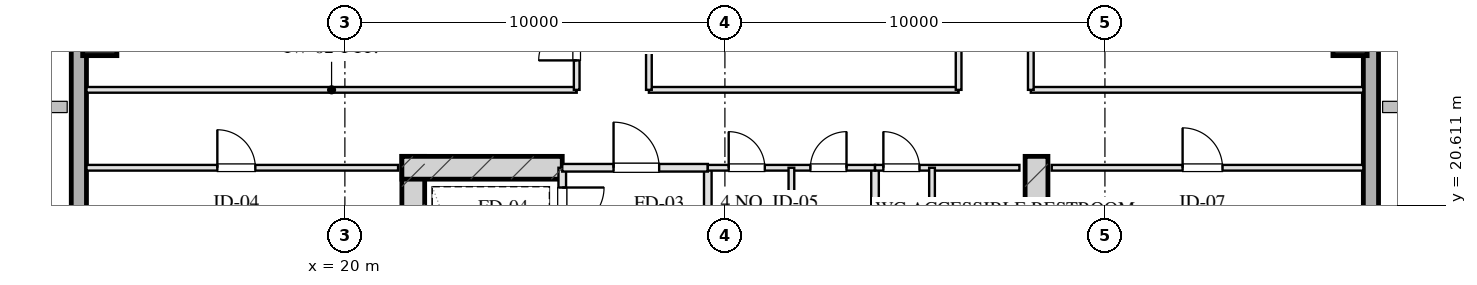
"""IFC4 building model, lengths in metres.
Left out: names, types, materials, properties, quantities, classifications, styles, units other than length and angle.
Written with IfcOpenShell. Run it as: python <this file> out.ifc"""

import sys

from ifc_helpers import new_model, si_unit, direction, frame, frame_2d, origin, origin_2d, place, context, subcontext, project, spatial, rectangle, hollow_rectangle, extrude, element, fill, save


model = new_model("IFC4")
c1 = context("Model", 3, precision=1e-05, world=origin(), true_north=direction((0.0, 1.0)))
c2 = subcontext(c1, "Body", "Model", "MODEL_VIEW")
j1 = project(units=[si_unit("LENGTHUNIT", "METRE"), si_unit("PLANEANGLEUNIT", "RADIAN")], contexts=[c1])
p1 = place(None, origin())
s1 = spatial("IfcSite", under=j1, at=p1, CompositionType="ELEMENT")
p2 = place(p1, origin())
s2 = spatial("IfcBuilding", under=s1, at=p2, CompositionType="ELEMENT")
p3 = place(p2, frame((0.0, 0.0, 173.65)))
s3 = spatial("IfcBuildingStorey", under=s2, at=p3, CompositionType="ELEMENT", Elevation=173.65)
for number, where, z_axis, x_axis in (
    (1, (21.8, 21.9, 0.0), (0.0, 0.0, 1.0), (0.0, -1.0, 0.0)),
    (2, (38.2, 21.9, 0.0), (0.0, 0.0, 1.0), (0.0, -1.0, 0.0)),
):
    element("IfcWall", number, at=place(p3, frame(where, z_axis=z_axis, x_axis=x_axis)), inside=s3, PredefinedType="SHEAR", context=c2, shape_type="SweptSolid", body=[
        extrude(rectangle(XDim=9.48, YDim=0.6, at=frame_2d((4.74, 0.0))), origin(), (0.0, 0.0, 1.0), 3.45),
    ])
p4 = place(p3, frame((21.5, 21.6, 0.0), z_axis=(0.0, 0.0, 1.0), x_axis=(1.0, 0.0, 0.0)))
e3 = element("IfcWall", 3, at=p4, inside=s3, PredefinedType="SHEAR", context=c2, shape_type="SweptSolid", body=[
    extrude(rectangle(XDim=4.22, YDim=0.6, at=frame_2d((2.11, 0.0))), origin(), (0.0, 0.0, 1.0), 3.45),
])
for number, where, z_axis, x_axis in (
    (4, (13.55, 25.0, 0.0), (0.0, 0.0, 1.0), (1.0, 0.0, 0.0)),
    (5, (46.45, 25.0, 0.0), (0.0, 0.0, 1.0), (1.0, 0.0, 0.0)),
):
    element("IfcColumn", number, at=place(p3, frame(where, z_axis=z_axis, x_axis=x_axis)), inside=s3, PredefinedType="COLUMN", context=c2, shape_type="SweptSolid", body=[
        extrude(hollow_rectangle(XDim=0.9, YDim=0.9, WallThickness=0.032, at=origin_2d()), origin(), (0.0, 0.0, 1.0), 3.451),
    ])
p5 = place(p3, frame((13.0, 10.8, 0.0), z_axis=(0.0, 0.0, 1.0), x_axis=(0.0, 1.0, 0.0)))
e6 = element("IfcWall", 6, at=p5, inside=s3, PredefinedType="SOLIDWALL", context=c2, shape_type="SweptSolid", body=[
    extrude(rectangle(XDim=46.4, YDim=0.4, at=frame_2d((23.2, 0.0))), origin(), (0.0, 0.0, 1.0), 2.61),
])
p6 = place(p5, frame((16.85, 0.0, 0.0)))
e7 = element("IfcOpeningElement", 7, at=p6, cuts=e6, PredefinedType="OPENING", context=c2, shape_type="SweptSolid", body=[
    extrude(rectangle(XDim=1.1, YDim=2.15, at=frame_2d((0.55, 1.075))), frame((0.0, 0.21, 0.0), z_axis=(0.0, -1.0, 0.0), x_axis=(1.0, 0.0, 0.0)), (0.0, 0.0, 1.0), 0.42),
])
p7 = place(p3, frame((47.0, 57.2, 0.0), z_axis=(0.0, 0.0, 1.0), x_axis=(0.0, -1.0, 0.0)))
e8 = element("IfcWall", 8, at=p7, inside=s3, PredefinedType="SOLIDWALL", context=c2, shape_type="SweptSolid", body=[
    extrude(rectangle(XDim=46.4, YDim=0.4, at=frame_2d((23.2, 0.0))), origin(), (0.0, 0.0, 1.0), 2.61),
])
p8 = place(p7, frame((19.475, 0.0, 0.75)))
e9 = element("IfcOpeningElement", 9, at=p8, cuts=e8, PredefinedType="OPENING", context=c2, shape_type="SweptSolid", body=[
    extrude(rectangle(XDim=2.25, YDim=1.46, at=frame_2d((1.125, 0.73))), frame((0.0, 0.21, 0.0), z_axis=(0.0, -1.0, 0.0), x_axis=(1.0, 0.0, 0.0)), (0.0, 0.0, 1.0), 0.42),
])
p9 = place(p7, frame((15.675, 0.0, 0.75)))
e10 = element("IfcOpeningElement", 10, at=p9, cuts=e8, PredefinedType="OPENING", context=c2, shape_type="SweptSolid", body=[
    extrude(rectangle(XDim=2.25, YDim=1.46, at=frame_2d((1.125, 0.73))), frame((0.0, 0.21, 0.0), z_axis=(0.0, -1.0, 0.0), x_axis=(1.0, 0.0, 0.0)), (0.0, 0.0, 1.0), 0.42),
])
p10 = place(p7, frame((27.05, 0.0, 0.0)))
e11 = element("IfcOpeningElement", 11, at=p10, cuts=e8, PredefinedType="OPENING", context=c2, shape_type="SweptSolid", body=[
    extrude(rectangle(XDim=1.1, YDim=2.15, at=frame_2d((0.55, 1.075))), frame((0.0, 0.21, 0.0), z_axis=(0.0, -1.0, 0.0), x_axis=(1.0, 0.0, 0.0)), (0.0, 0.0, 1.0), 0.42),
])
p11 = place(p3, frame((25.72, 21.6, 0.0), z_axis=(0.0, 0.0, 1.0), x_axis=(0.0, -1.0, 0.0)))
e12 = element("IfcWall", 12, at=p11, inside=s3, PredefinedType="PARTITIONING", context=c2, shape_type="SweptSolid", body=[
    extrude(rectangle(XDim=1.9, YDim=0.2, at=frame_2d((0.95, 0.0))), origin(), (0.0, 0.0, 1.0), 3.175),
])
p12 = place(p11, frame((0.52, 0.0, 0.0)))
e13 = element("IfcOpeningElement", 13, at=p12, cuts=e12, PredefinedType="OPENING", context=c2, shape_type="SweptSolid", body=[
    extrude(rectangle(XDim=1.1, YDim=2.05, at=frame_2d((0.55, 1.025))), frame((0.0, 0.11, 0.0), z_axis=(0.0, -1.0, 0.0), x_axis=(1.0, 0.0, 0.0)), (0.0, 0.0, 1.0), 0.22),
])
p13 = place(p3, frame((29.55, 21.6, 0.0), z_axis=(0.0, 0.0, 1.0), x_axis=(0.0, -1.0, 0.0)))
e14 = element("IfcWall", 14, at=p13, inside=s3, PredefinedType="PARTITIONING", context=c2, shape_type="SweptSolid", body=[
    extrude(rectangle(XDim=8.43, YDim=0.2, at=frame_2d((4.215, 0.0))), origin(), (0.0, 0.0, 1.0), 3.175),
])
p14 = place(p3, frame((25.72, 21.6, 0.0), z_axis=(0.0, 0.0, 1.0), x_axis=(1.0, 0.0, 0.0)))
e15 = element("IfcWall", 15, at=p14, inside=s3, PredefinedType="PARTITIONING", context=c2, shape_type="SweptSolid", body=[
    extrude(rectangle(XDim=3.83, YDim=0.2, at=frame_2d((1.915, 0.0))), origin(), (0.0, 0.0, 1.0), 3.175),
])
p15 = place(p14, frame((1.35, 0.0, 0.0)))
e16 = element("IfcOpeningElement", 16, at=p15, cuts=e15, PredefinedType="OPENING", context=c2, shape_type="SweptSolid", body=[
    extrude(rectangle(XDim=1.2, YDim=2.05, at=frame_2d((0.6, 1.025))), frame((0.0, 0.11, 0.0), z_axis=(0.0, -1.0, 0.0), x_axis=(1.0, 0.0, 0.0)), (0.0, 0.0, 1.0), 0.22),
])
p16 = place(p3, frame((33.95, 21.6, 0.0), z_axis=(0.0, 0.0, 1.0), x_axis=(0.0, -1.0, 0.0)))
e17 = element("IfcWall", 17, at=p16, inside=s3, PredefinedType="PARTITIONING", context=c2, shape_type="SweptSolid", body=[
    extrude(rectangle(XDim=8.43, YDim=0.2, at=frame_2d((4.215, 0.0))), origin(), (0.0, 0.0, 1.0), 3.175),
])
p17 = place(p3, frame((29.55, 21.6, 0.0), z_axis=(0.0, 0.0, 1.0), x_axis=(1.0, 0.0, 0.0)))
e18 = element("IfcWall", 18, at=p17, inside=s3, PredefinedType="PARTITIONING", context=c2, shape_type="SweptSolid", body=[
    extrude(rectangle(XDim=4.4, YDim=0.15, at=frame_2d((2.2, 0.0))), origin(), (0.0, 0.0, 1.0), 3.175),
])
p18 = place(p17, frame((0.55, 0.0, 0.0)))
e19 = element("IfcOpeningElement", 19, at=p18, cuts=e18, PredefinedType="OPENING", context=c2, shape_type="SweptSolid", body=[
    extrude(rectangle(XDim=0.95, YDim=2.05, at=frame_2d((0.475, 1.025))), frame((0.0, 0.085, 0.0), z_axis=(0.0, -1.0, 0.0), x_axis=(1.0, 0.0, 0.0)), (0.0, 0.0, 1.0), 0.17),
])
p19 = place(p17, frame((2.7, 0.0, 0.0)))
e20 = element("IfcOpeningElement", 20, at=p19, cuts=e18, PredefinedType="OPENING", context=c2, shape_type="SweptSolid", body=[
    extrude(rectangle(XDim=0.95, YDim=2.05, at=frame_2d((0.475, 1.025))), frame((0.0, 0.085, 0.0), z_axis=(0.0, -1.0, 0.0), x_axis=(1.0, 0.0, 0.0)), (0.0, 0.0, 1.0), 0.17),
])
p20 = place(p3, frame((31.75, 21.6, 0.0), z_axis=(0.0, 0.0, 1.0), x_axis=(0.0, -1.0, 0.0)))
e21 = element("IfcWall", 21, at=p20, inside=s3, PredefinedType="PARTITIONING", context=c2, shape_type="SweptSolid", body=[
    extrude(rectangle(XDim=8.43, YDim=0.15, at=frame_2d((4.215, 0.0))), origin(), (0.0, 0.0, 1.0), 3.175),
])
p21 = place(p3, frame((33.95, 21.6, 0.0), z_axis=(0.0, 0.0, 1.0), x_axis=(1.0, 0.0, 0.0)))
e22 = element("IfcWall", 22, at=p21, inside=s3, PredefinedType="PARTITIONING", context=c2, shape_type="SweptSolid", body=[
    extrude(rectangle(XDim=3.8, YDim=0.15, at=frame_2d((1.9, 0.0))), origin(), (0.0, 0.0, 1.0), 3.175),
])
p22 = place(p21, frame((0.22, 0.0, 0.0)))
e23 = element("IfcOpeningElement", 23, at=p22, cuts=e22, PredefinedType="OPENING", context=c2, shape_type="SweptSolid", body=[
    extrude(rectangle(XDim=0.95, YDim=2.05, at=frame_2d((0.475, 1.025))), frame((0.0, 0.085, 0.0), z_axis=(0.0, -1.0, 0.0), x_axis=(1.0, 0.0, 0.0)), (0.0, 0.0, 1.0), 0.17),
])
p23 = place(p3, frame((35.45, 21.6, 0.0), z_axis=(0.0, 0.0, 1.0), x_axis=(0.0, -1.0, 0.0)))
e24 = element("IfcWall", 24, at=p23, inside=s3, PredefinedType="PARTITIONING", context=c2, shape_type="SweptSolid", body=[
    extrude(rectangle(XDim=8.43, YDim=0.15, at=frame_2d((4.215, 0.0))), origin(), (0.0, 0.0, 1.0), 2.765),
])
p24 = place(p23, frame((2.55, 0.0, 0.0)))
e25 = element("IfcOpeningElement", 25, at=p24, cuts=e24, PredefinedType="OPENING", context=c2, shape_type="SweptSolid", body=[
    extrude(rectangle(XDim=0.95, YDim=2.05, at=frame_2d((0.475, 1.025))), frame((0.0, 0.085, 0.0), z_axis=(0.0, -1.0, 0.0), x_axis=(1.0, 0.0, 0.0)), (0.0, 0.0, 1.0), 0.17),
])
p25 = place(p23, frame((5.8, 0.0, 0.0)))
e26 = element("IfcOpeningElement", 26, at=p25, cuts=e24, PredefinedType="OPENING", context=c2, shape_type="SweptSolid", body=[
    extrude(rectangle(XDim=0.9, YDim=2.05, at=frame_2d((0.45, 1.025))), frame((0.0, 0.085, 0.0), z_axis=(0.0, -1.0, 0.0), x_axis=(1.0, 0.0, 0.0)), (0.0, 0.0, 1.0), 0.17),
])
p26 = place(p3, frame((13.2, 21.6, 0.0), z_axis=(0.0, 0.0, 1.0), x_axis=(1.0, 0.0, 0.0)))
e27 = element("IfcWall", 27, at=p26, inside=s3, PredefinedType="PARTITIONING", context=c2, shape_type="SweptSolid", body=[
    extrude(rectangle(XDim=8.2, YDim=0.15, at=frame_2d((4.1, 0.0))), origin(), (0.0, 0.0, 1.0), 3.175),
])
p27 = place(p26, frame((3.444, 0.0, 0.0)))
e28 = element("IfcOpeningElement", 28, at=p27, cuts=e27, PredefinedType="OPENING", context=c2, shape_type="SweptSolid", body=[
    extrude(rectangle(XDim=1.0, YDim=2.05, at=frame_2d((0.5, 1.025))), frame((0.0, 0.085, 0.0), z_axis=(0.0, -1.0, 0.0), x_axis=(1.0, 0.0, 0.0)), (0.0, 0.0, 1.0), 0.17),
])
p28 = place(p3, frame((38.6, 21.6, 0.0), z_axis=(0.0, 0.0, 1.0), x_axis=(1.0, 0.0, 0.0)))
e29 = element("IfcWall", 29, at=p28, inside=s3, PredefinedType="PARTITIONING", context=c2, shape_type="SweptSolid", body=[
    extrude(rectangle(XDim=8.2, YDim=0.15, at=frame_2d((4.1, 0.0))), origin(), (0.0, 0.0, 1.0), 3.175),
])
p29 = place(p28, frame((3.444, 0.0, 0.0)))
e30 = element("IfcOpeningElement", 30, at=p29, cuts=e29, PredefinedType="OPENING", context=c2, shape_type="SweptSolid", body=[
    extrude(rectangle(XDim=1.05, YDim=2.05, at=frame_2d((0.525, 1.025))), frame((0.0, 0.085, 0.0), z_axis=(0.0, -1.0, 0.0), x_axis=(1.0, 0.0, 0.0)), (0.0, 0.0, 1.0), 0.17),
])
p30 = place(p3, frame((13.2, 23.65, 0.0), z_axis=(0.0, 0.0, 1.0), x_axis=(1.0, 0.0, 0.0)))
e31 = element("IfcWall", 31, at=p30, inside=s3, PredefinedType="PARTITIONING", context=c2, shape_type="SweptSolid", body=[
    extrude(rectangle(XDim=12.9, YDim=0.15, at=frame_2d((6.45, 0.0))), origin(), (0.0, 0.0, 1.0), 3.175),
])
p31 = place(p3, frame((28.0, 23.65, 0.0), z_axis=(0.0, 0.0, 1.0), x_axis=(1.0, 0.0, 0.0)))
e32 = element("IfcWall", 32, at=p31, inside=s3, PredefinedType="PARTITIONING", context=c2, shape_type="SweptSolid", body=[
    extrude(rectangle(XDim=8.15, YDim=0.15, at=frame_2d((4.075, 0.0))), origin(), (0.0, 0.0, 1.0), 3.175),
])
p32 = place(p3, frame((38.05, 23.65, 0.0), z_axis=(0.0, 0.0, 1.0), x_axis=(1.0, 0.0, 0.0)))
e33 = element("IfcWall", 33, at=p32, inside=s3, PredefinedType="PARTITIONING", context=c2, shape_type="SweptSolid", body=[
    extrude(rectangle(XDim=8.75, YDim=0.15, at=frame_2d((4.375, 0.0))), origin(), (0.0, 0.0, 1.0), 3.175),
])
p33 = place(p3, frame((26.1, 23.65, 0.0), z_axis=(0.0, 0.0, 1.0), x_axis=(0.0, 1.0, 0.0)))
e34 = element("IfcWall", 34, at=p33, inside=s3, PredefinedType="PARTITIONING", context=c2, shape_type="SweptSolid", body=[
    extrude(rectangle(XDim=20.7, YDim=0.15, at=frame_2d((10.35, 0.0))), origin(), (0.0, 0.0, 1.0), 3.175),
])
p34 = place(p33, frame((0.775, 0.0, 0.0)))
e35 = element("IfcOpeningElement", 35, at=p34, cuts=e34, PredefinedType="OPENING", context=c2, shape_type="SweptSolid", body=[
    extrude(rectangle(XDim=1.0, YDim=2.05, at=frame_2d((0.5, 1.025))), frame((0.0, 0.085, 0.0), z_axis=(0.0, -1.0, 0.0), x_axis=(1.0, 0.0, 0.0)), (0.0, 0.0, 1.0), 0.17),
])
p35 = place(p33, frame((3.95, 0.0, 0.0)))
e36 = element("IfcOpeningElement", 36, at=p35, cuts=e34, PredefinedType="OPENING", context=c2, shape_type="SweptSolid", body=[
    extrude(rectangle(XDim=1.0, YDim=2.05, at=frame_2d((0.5, 1.025))), frame((0.0, 0.085, 0.0), z_axis=(0.0, -1.0, 0.0), x_axis=(1.0, 0.0, 0.0)), (0.0, 0.0, 1.0), 0.17),
])
p36 = place(p33, frame((7.51, 0.0, 0.0)))
e37 = element("IfcOpeningElement", 37, at=p36, cuts=e34, PredefinedType="OPENING", context=c2, shape_type="SweptSolid", body=[
    extrude(rectangle(XDim=1.0, YDim=2.05, at=frame_2d((0.5, 1.025))), frame((0.0, 0.085, 0.0), z_axis=(0.0, -1.0, 0.0), x_axis=(1.0, 0.0, 0.0)), (0.0, 0.0, 1.0), 0.17),
])
p37 = place(p33, frame((11.51, 0.0, 0.0)))
e38 = element("IfcOpeningElement", 38, at=p37, cuts=e34, PredefinedType="OPENING", context=c2, shape_type="SweptSolid", body=[
    extrude(rectangle(XDim=1.0, YDim=2.05, at=frame_2d((0.5, 1.025))), frame((0.0, 0.085, 0.0), z_axis=(0.0, -1.0, 0.0), x_axis=(1.0, 0.0, 0.0)), (0.0, 0.0, 1.0), 0.17),
])
p38 = place(p33, frame((15.75, 0.0, 0.0)))
e39 = element("IfcOpeningElement", 39, at=p38, cuts=e34, PredefinedType="OPENING", context=c2, shape_type="SweptSolid", body=[
    extrude(rectangle(XDim=1.05, YDim=2.05, at=frame_2d((0.525, 1.025))), frame((0.0, 0.085, 0.0), z_axis=(0.0, -1.0, 0.0), x_axis=(1.0, 0.0, 0.0)), (0.0, 0.0, 1.0), 0.17),
])
p39 = place(p33, frame((18.925, 0.0, 0.0)))
e40 = element("IfcOpeningElement", 40, at=p39, cuts=e34, PredefinedType="OPENING", context=c2, shape_type="SweptSolid", body=[
    extrude(rectangle(XDim=1.0, YDim=2.05, at=frame_2d((0.5, 1.025))), frame((0.0, 0.085, 0.0), z_axis=(0.0, -1.0, 0.0), x_axis=(1.0, 0.0, 0.0)), (0.0, 0.0, 1.0), 0.17),
])
p40 = place(p3, frame((28.0, 23.65, 0.0), z_axis=(0.0, 0.0, 1.0), x_axis=(0.0, 1.0, 0.0)))
e41 = element("IfcWall", 41, at=p40, inside=s3, PredefinedType="PARTITIONING", context=c2, shape_type="SweptSolid", body=[
    extrude(rectangle(XDim=20.7, YDim=0.15, at=frame_2d((10.35, 0.0))), origin(), (0.0, 0.0, 1.0), 3.175),
])
p41 = place(p40, frame((2.857, 0.0, 0.0)))
e42 = element("IfcOpeningElement", 42, at=p41, cuts=e41, PredefinedType="OPENING", context=c2, shape_type="SweptSolid", body=[
    extrude(rectangle(XDim=1.1, YDim=2.05, at=frame_2d((0.55, 1.025))), frame((0.0, 0.085, 0.0), z_axis=(0.0, -1.0, 0.0), x_axis=(1.0, 0.0, 0.0)), (0.0, 0.0, 1.0), 0.17),
])
p42 = place(p40, frame((17.208, 0.0, 0.0)))
e43 = element("IfcOpeningElement", 43, at=p42, cuts=e41, PredefinedType="OPENING", context=c2, shape_type="SweptSolid", body=[
    extrude(rectangle(XDim=1.1, YDim=2.05, at=frame_2d((0.55, 1.025))), frame((0.0, 0.085, 0.0), z_axis=(0.0, -1.0, 0.0), x_axis=(1.0, 0.0, 0.0)), (0.0, 0.0, 1.0), 0.17),
])
p43 = place(p3, frame((36.15, 23.65, 0.0), z_axis=(0.0, 0.0, 1.0), x_axis=(0.0, 1.0, 0.0)))
e44 = element("IfcWall", 44, at=p43, inside=s3, PredefinedType="PARTITIONING", context=c2, shape_type="SweptSolid", body=[
    extrude(rectangle(XDim=20.7, YDim=0.15, at=frame_2d((10.35, 0.0))), origin(), (0.0, 0.0, 1.0), 3.175),
])
p44 = place(p43, frame((9.71, 0.0, 0.0)))
e45 = element("IfcOpeningElement", 45, at=p44, cuts=e44, PredefinedType="OPENING", context=c2, shape_type="SweptSolid", body=[
    extrude(rectangle(XDim=1.1, YDim=2.05, at=frame_2d((0.55, 1.025))), frame((0.0, 0.085, 0.0), z_axis=(0.0, -1.0, 0.0), x_axis=(1.0, 0.0, 0.0)), (0.0, 0.0, 1.0), 0.17),
])
p45 = place(p3, frame((38.05, 23.65, 0.0), z_axis=(0.0, 0.0, 1.0), x_axis=(0.0, 1.0, 0.0)))
e46 = element("IfcWall", 46, at=p45, inside=s3, PredefinedType="PARTITIONING", context=c2, shape_type="SweptSolid", body=[
    extrude(rectangle(XDim=20.7, YDim=0.15, at=frame_2d((10.35, 0.0))), origin(), (0.0, 0.0, 1.0), 3.175),
])
p46 = place(p45, frame((4.148, 0.0, 0.0)))
e47 = element("IfcOpeningElement", 47, at=p46, cuts=e46, PredefinedType="OPENING", context=c2, shape_type="SweptSolid", body=[
    extrude(rectangle(XDim=1.0, YDim=2.05, at=frame_2d((0.5, 1.025))), frame((0.0, 0.085, 0.0), z_axis=(0.0, -1.0, 0.0), x_axis=(1.0, 0.0, 0.0)), (0.0, 0.0, 1.0), 0.17),
])
p47 = place(p45, frame((14.499, 0.0, 0.0)))
e48 = element("IfcOpeningElement", 48, at=p47, cuts=e46, PredefinedType="OPENING", context=c2, shape_type="SweptSolid", body=[
    extrude(rectangle(XDim=1.0, YDim=2.05, at=frame_2d((0.5, 1.025))), frame((0.0, 0.085, 0.0), z_axis=(0.0, -1.0, 0.0), x_axis=(1.0, 0.0, 0.0)), (0.0, 0.0, 1.0), 0.17),
])
p48 = place(p12, origin())
e49 = element("IfcDoor", 49, at=p48, inside=s3, OperationType="SINGLE_SWING_LEFT", PredefinedType="DOOR", context=c2, shape_type="SweptSolid", body=[
    extrude(rectangle(XDim=1.1, YDim=2.05, at=frame_2d((0.55, 1.025))), frame((0.0, 0.025, 0.0), z_axis=(0.0, -1.0, 0.0), x_axis=(1.0, 0.0, 0.0)), (0.0, 0.0, 1.0), 0.05),
])
fill(e13, e49)
p49 = place(p15, origin())
e50 = element("IfcDoor", 50, at=p49, inside=s3, OperationType="SINGLE_SWING_LEFT", PredefinedType="DOOR", context=c2, shape_type="SweptSolid", body=[
    extrude(rectangle(XDim=1.2, YDim=2.05, at=frame_2d((0.6, 1.025))), frame((0.0, 0.025, 0.0), z_axis=(0.0, -1.0, 0.0), x_axis=(1.0, 0.0, 0.0)), (0.0, 0.0, 1.0), 0.05),
])
fill(e16, e50)
p50 = place(p18, origin())
e51 = element("IfcDoor", 51, at=p50, inside=s3, OperationType="SINGLE_SWING_LEFT", PredefinedType="DOOR", context=c2, shape_type="SweptSolid", body=[
    extrude(rectangle(XDim=0.95, YDim=2.05, at=frame_2d((0.475, 1.025))), frame((0.0, 0.025, 0.0), z_axis=(0.0, -1.0, 0.0), x_axis=(1.0, 0.0, 0.0)), (0.0, 0.0, 1.0), 0.05),
])
fill(e19, e51)
p51 = place(p19, origin())
e52 = element("IfcDoor", 52, at=p51, inside=s3, OperationType="SINGLE_SWING_RIGHT", PredefinedType="DOOR", context=c2, shape_type="SweptSolid", body=[
    extrude(rectangle(XDim=0.95, YDim=2.05, at=frame_2d((0.475, 1.025))), frame((0.0, 0.025, 0.0), z_axis=(0.0, -1.0, 0.0), x_axis=(1.0, 0.0, 0.0)), (0.0, 0.0, 1.0), 0.05),
])
fill(e20, e52)
p52 = place(p22, origin())
e53 = element("IfcDoor", 53, at=p52, inside=s3, OperationType="SINGLE_SWING_LEFT", PredefinedType="DOOR", context=c2, shape_type="SweptSolid", body=[
    extrude(rectangle(XDim=0.95, YDim=2.05, at=frame_2d((0.475, 1.025))), frame((0.0, 0.025, 0.0), z_axis=(0.0, -1.0, 0.0), x_axis=(1.0, 0.0, 0.0)), (0.0, 0.0, 1.0), 0.05),
])
fill(e23, e53)
p53 = place(p27, origin())
e54 = element("IfcDoor", 54, at=p53, inside=s3, OperationType="SINGLE_SWING_LEFT", PredefinedType="DOOR", context=c2, shape_type="SweptSolid", body=[
    extrude(rectangle(XDim=1.0, YDim=2.05, at=frame_2d((0.5, 1.025))), frame((0.0, 0.025, 0.0), z_axis=(0.0, -1.0, 0.0), x_axis=(1.0, 0.0, 0.0)), (0.0, 0.0, 1.0), 0.05),
])
fill(e28, e54)
p54 = place(p29, origin())
e55 = element("IfcDoor", 55, at=p54, inside=s3, OperationType="SINGLE_SWING_LEFT", PredefinedType="DOOR", context=c2, shape_type="SweptSolid", body=[
    extrude(rectangle(XDim=1.05, YDim=2.05, at=frame_2d((0.525, 1.025))), frame((0.0, 0.025, 0.0), z_axis=(0.0, -1.0, 0.0), x_axis=(1.0, 0.0, 0.0)), (0.0, 0.0, 1.0), 0.05),
])
fill(e30, e55)
p55 = place(p34, origin())
e56 = element("IfcDoor", 56, at=p55, inside=s3, OperationType="SINGLE_SWING_LEFT", PredefinedType="DOOR", context=c2, shape_type="SweptSolid", body=[
    extrude(rectangle(XDim=1.0, YDim=2.05, at=frame_2d((0.5, 1.025))), frame((0.0, 0.025, 0.0), z_axis=(0.0, -1.0, 0.0), x_axis=(1.0, 0.0, 0.0)), (0.0, 0.0, 1.0), 0.05),
])
fill(e35, e56)
save(model, sys.argv[1])
